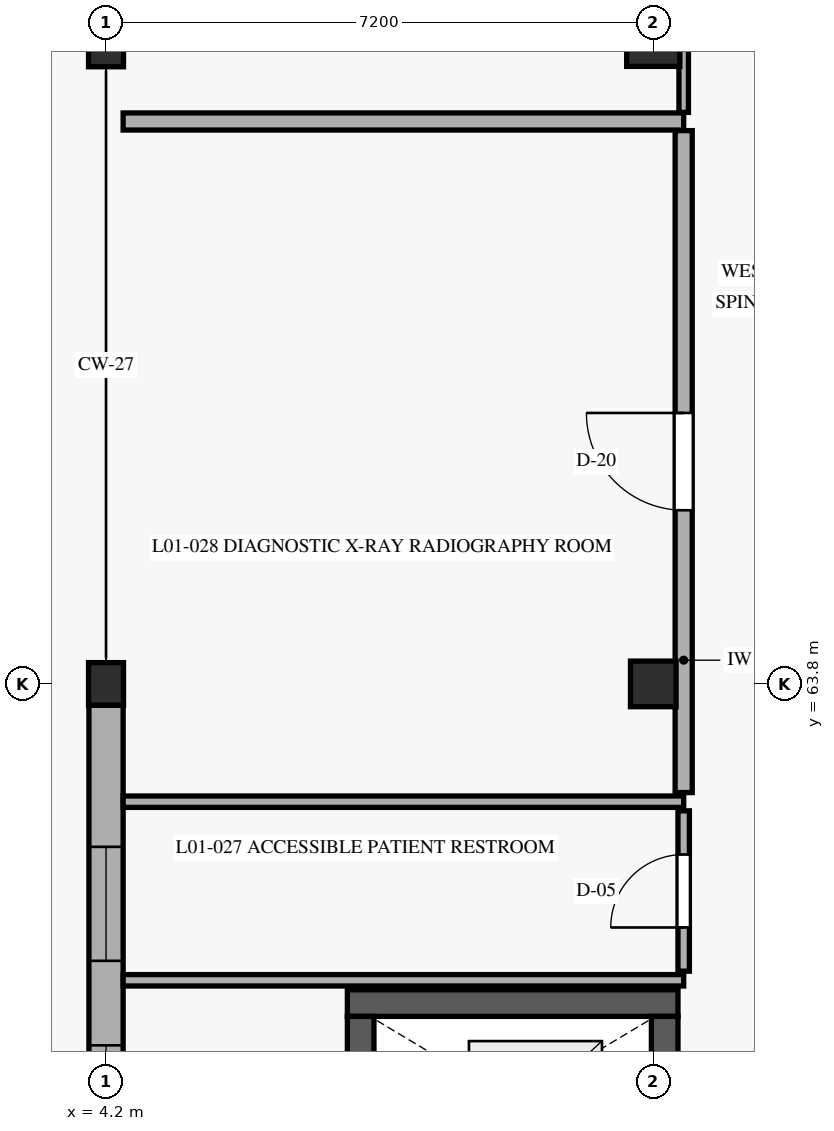
"""IFC4 building model, lengths in metres.
Left out: names, types, materials, properties, quantities, classifications, styles, units other than length and angle.
Written with IfcOpenShell. Run it as: python <this file> out.ifc"""

import sys

from ifc_helpers import new_model, si_unit, direction, frame, frame_2d, origin, origin_with_axes, origin_2d, place, context, subcontext, project, spatial, rectangle, extrude, element, fill, save


model = new_model("IFC4")
c1 = context("Model", 3, precision=1e-05, world=origin(), true_north=direction((0.0, 1.0)))
c2 = subcontext(c1, "Body", "Model", "MODEL_VIEW")
j1 = project(units=[si_unit("LENGTHUNIT", "METRE"), si_unit("PLANEANGLEUNIT", "RADIAN")], contexts=[c1])
p1 = place(None, origin())
s1 = spatial("IfcSite", under=j1, at=p1, CompositionType="ELEMENT")
p2 = place(p1, origin())
s2 = spatial("IfcBuilding", under=s1, at=p2, CompositionType="ELEMENT")
p3 = place(p2, origin())
s3 = spatial("IfcBuildingStorey", under=s2, at=p3, CompositionType="ELEMENT", Elevation=0.0)
for number, where, z_axis, x_axis in (
    (1, (4.2, 63.8, 0.0), (0.0, 0.0, 1.0), (1.0, 0.0, 0.0)),
    (2, (4.2, 72.2, 0.0), (0.0, 0.0, 1.0), (1.0, 0.0, 0.0)),
):
    element("IfcColumn", number, at=place(p3, frame(where, z_axis=z_axis, x_axis=x_axis)), inside=s3, PredefinedType="COLUMN", context=c2, shape_type="SweptSolid", body=[
        extrude(rectangle(XDim=0.46, YDim=0.56, at=origin_2d()), origin(), (0.0, 0.0, 1.0), 4.8),
    ])
p4 = place(p3, frame((11.4, 63.8, 0.0), z_axis=(0.0, 0.0, 1.0), x_axis=(1.0, 0.0, 0.0)))
e3 = element("IfcColumn", 3, at=p4, inside=s3, PredefinedType="COLUMN", context=c2, shape_type="SweptSolid", body=[
    extrude(rectangle(XDim=0.6, YDim=0.6, at=origin_2d()), origin(), (0.0, 0.0, 1.0), 4.8),
])
p5 = place(p3, frame((11.4, 72.2, 0.0), z_axis=(0.0, 0.0, 1.0), x_axis=(1.0, 0.0, 0.0)))
e4 = element("IfcColumn", 4, at=p5, inside=s3, PredefinedType="COLUMN", context=c2, shape_type="SweptSolid", body=[
    extrude(rectangle(XDim=0.7, YDim=0.55, at=origin_2d()), origin(), (0.0, 0.0, 1.0), 4.8),
])
p6 = place(p3, frame((11.725, 59.6, 0.0), z_axis=(0.0, 0.0, 1.0), x_axis=(-1.0, 0.0, 0.0)))
e5 = element("IfcWall", 5, at=p6, inside=s3, PredefinedType="SHEAR", context=c2, shape_type="SweptSolid", body=[
    extrude(rectangle(XDim=4.35, YDim=0.35, at=frame_2d((2.175, 0.0))), origin(), (0.0, 0.0, 1.0), 4.5),
])
p7 = place(p3, frame((7.55, 59.425, 0.0), z_axis=(0.0, 0.0, 1.0), x_axis=(0.0, -1.0, 0.0)))
e6 = element("IfcWall", 6, at=p7, inside=s3, PredefinedType="SHEAR", context=c2, shape_type="SweptSolid", body=[
    extrude(rectangle(XDim=9.45, YDim=0.35, at=frame_2d((4.725, 0.0))), origin(), (0.0, 0.0, 1.0), 4.5),
])
p8 = place(p7, frame((8.05, 0.0, 0.0)))
e7 = element("IfcOpeningElement", 7, at=p8, cuts=e6, PredefinedType="OPENING", context=c2, shape_type="SweptSolid", body=[
    extrude(rectangle(XDim=1.1, YDim=2.2, at=frame_2d((0.55, 1.1))), frame((0.0, 0.185, 0.0), z_axis=(0.0, -1.0, 0.0), x_axis=(1.0, 0.0, 0.0)), (0.0, 0.0, 1.0), 0.37),
])
p9 = place(p3, frame((11.55, 49.975, 0.0), z_axis=(0.0, 0.0, 1.0), x_axis=(0.0, 1.0, 0.0)))
e8 = element("IfcWall", 8, at=p9, inside=s3, PredefinedType="SHEAR", context=c2, shape_type="SweptSolid", body=[
    extrude(rectangle(XDim=9.45, YDim=0.35, at=frame_2d((4.725, 0.0))), origin(), (0.0, 0.0, 1.0), 4.5),
])
p10 = place(p9, frame((0.2, 0.0, 0.0)))
e9 = element("IfcOpeningElement", 9, at=p10, cuts=e8, PredefinedType="OPENING", context=c2, shape_type="SweptSolid", body=[
    extrude(rectangle(XDim=1.1, YDim=2.2, at=frame_2d((0.55, 1.1))), frame((0.0, 0.185, 0.0), z_axis=(0.0, -1.0, 0.0), x_axis=(1.0, 0.0, 0.0)), (0.0, 0.0, 1.0), 0.37),
])
p11 = place(p9, frame((7.815, 0.0, 0.0)))
e10 = element("IfcOpeningElement", 10, at=p11, cuts=e8, PredefinedType="OPENING", context=c2, shape_type="SweptSolid", body=[
    extrude(rectangle(XDim=1.02, YDim=2.15, at=frame_2d((0.51, 1.075))), frame((0.0, 0.185, 0.0), z_axis=(0.0, -1.0, 0.0), x_axis=(1.0, 0.0, 0.0)), (0.0, 0.0, 1.0), 0.37),
])
p12 = place(p3, frame((4.2, 63.518, 0.0), z_axis=(0.0, 0.0, 1.0), x_axis=(0.0, -1.0, 0.0)))
e11 = element("IfcWall", 11, at=p12, inside=s3, PredefinedType="SOLIDWALL", context=c2, shape_type="SweptSolid", body=[
    extrude(rectangle(XDim=7.836, YDim=0.45, at=frame_2d((3.918, 0.0))), origin(), (0.0, 0.0, 1.0), 3.95),
])
p13 = place(p12, frame((1.862, 0.0, 0.65)))
e12 = element("IfcOpeningElement", 12, at=p13, cuts=e11, PredefinedType="OPENING", context=c2, shape_type="SweptSolid", body=[
    extrude(rectangle(XDim=1.5, YDim=2.2, at=frame_2d((0.75, 1.1))), frame((0.0, 0.235, 0.0), z_axis=(0.0, -1.0, 0.0), x_axis=(1.0, 0.0, 0.0)), (0.0, 0.0, 1.0), 0.47),
])
p14 = place(p12, frame((4.474, 0.0, 0.65)))
e13 = element("IfcOpeningElement", 13, at=p14, cuts=e11, PredefinedType="OPENING", context=c2, shape_type="SweptSolid", body=[
    extrude(rectangle(XDim=1.5, YDim=2.2, at=frame_2d((0.75, 1.1))), frame((0.0, 0.235, 0.0), z_axis=(0.0, -1.0, 0.0), x_axis=(1.0, 0.0, 0.0)), (0.0, 0.0, 1.0), 0.47),
])
p15 = place(p3, frame((11.8, 60.02, 0.0), z_axis=(0.0, 0.0, 1.0), x_axis=(0.0, 1.0, 0.0)))
e14 = element("IfcWall", 14, at=p15, inside=s3, PredefinedType="PARTITIONING", context=c2, shape_type="SweptSolid", body=[
    extrude(rectangle(XDim=2.11, YDim=0.15, at=frame_2d((1.055, 0.0))), origin(), (0.0, 0.0, 1.0), 3.895),
])
p16 = place(p15, frame((0.575, 0.0, 0.0)))
e15 = element("IfcOpeningElement", 15, at=p16, cuts=e14, PredefinedType="OPENING", context=c2, shape_type="SweptSolid", body=[
    extrude(rectangle(XDim=0.96, YDim=2.1, at=frame_2d((0.48, 1.05))), frame((0.0, 0.085, 0.0), z_axis=(0.0, -1.0, 0.0), x_axis=(1.0, 0.0, 0.0)), (0.0, 0.0, 1.0), 0.17),
])
for number, where, z_axis, x_axis in (
    (16, (4.425, 62.25, 0.0), (0.0, 0.0, 1.0), (1.0, 0.0, 0.0)),
    (17, (4.425, 59.9, 0.0), (0.0, 0.0, 1.0), (1.0, 0.0, 0.0)),
):
    element("IfcWall", number, at=place(p3, frame(where, z_axis=z_axis, x_axis=x_axis)), inside=s3, PredefinedType="PARTITIONING", context=c2, shape_type="SweptSolid", body=[
        extrude(rectangle(XDim=7.375, YDim=0.15, at=frame_2d((3.688, 0.0))), origin(), (0.0, 0.0, 1.0), 3.895),
    ])
p17 = place(p3, frame((11.8, 62.37, 0.0), z_axis=(0.0, 0.0, 1.0), x_axis=(0.0, 1.0, 0.0)))
e18 = element("IfcWall", 18, at=p17, inside=s3, PredefinedType="SOLIDWALL", context=c2, shape_type="SweptSolid", body=[
    extrude(rectangle(XDim=8.71, YDim=0.225, at=frame_2d((4.355, 0.0))), origin(), (0.0, 0.0, 1.0), 3.895),
])
p18 = place(p17, frame((3.715, 0.0, 0.0)))
e19 = element("IfcOpeningElement", 19, at=p18, cuts=e18, PredefinedType="OPENING", context=c2, shape_type="SweptSolid", body=[
    extrude(rectangle(XDim=1.28, YDim=2.25, at=frame_2d((0.64, 1.125))), frame((0.0, 0.123, 0.0), z_axis=(0.0, -1.0, 0.0), x_axis=(1.0, 0.0, 0.0)), (0.0, 0.0, 1.0), 0.245),
])
p19 = place(p3, frame((4.425, 71.2, 0.0), z_axis=(0.0, 0.0, 1.0), x_axis=(1.0, 0.0, 0.0)))
e20 = element("IfcWall", 20, at=p19, inside=s3, PredefinedType="SOLIDWALL", context=c2, shape_type="SweptSolid", body=[
    extrude(rectangle(XDim=7.375, YDim=0.225, at=frame_2d((3.688, 0.0))), origin(), (0.0, 0.0, 1.0), 3.945),
])
p20 = place(p3, frame((11.8, 71.32, 0.0), z_axis=(0.0, 0.0, 1.0), x_axis=(0.0, 1.0, 0.0)))
e21 = element("IfcWall", 21, at=p20, inside=s3, PredefinedType="PARTITIONING", context=c2, shape_type="SweptSolid", body=[
    extrude(rectangle(XDim=6.97, YDim=0.125, at=frame_2d((3.485, 0.0))), origin(), (0.0, 0.0, 1.0), 3.895),
])
p21 = place(p20, frame((2.839, 0.0, 0.0)))
e22 = element("IfcOpeningElement", 22, at=p21, cuts=e21, PredefinedType="OPENING", context=c2, shape_type="SweptSolid", body=[
    extrude(rectangle(XDim=1.14, YDim=2.22, at=frame_2d((0.57, 1.11))), frame((0.0, 0.073, 0.0), z_axis=(0.0, -1.0, 0.0), x_axis=(1.0, 0.0, 0.0)), (0.0, 0.0, 1.0), 0.145),
])
p22 = place(p13, origin_with_axes())
e23 = element("IfcWindow", 23, at=p22, inside=s3, PartitioningType="SINGLE_PANEL", PredefinedType="WINDOW", context=c2, shape_type="SweptSolid", body=[
    extrude(rectangle(XDim=1.5, YDim=2.2, at=frame_2d((0.75, 1.1))), frame((0.0, 0.03, 0.0), z_axis=(0.0, -1.0, 0.0), x_axis=(1.0, 0.0, 0.0)), (0.0, 0.0, 1.0), 0.06),
])
fill(e12, e23)
p23 = place(p14, origin_with_axes())
e24 = element("IfcWindow", 24, at=p23, inside=s3, PartitioningType="SINGLE_PANEL", PredefinedType="WINDOW", context=c2, shape_type="SweptSolid", body=[
    extrude(rectangle(XDim=1.5, YDim=2.2, at=frame_2d((0.75, 1.1))), frame((0.0, 0.03, 0.0), z_axis=(0.0, -1.0, 0.0), x_axis=(1.0, 0.0, 0.0)), (0.0, 0.0, 1.0), 0.06),
])
fill(e13, e24)
p24 = place(p16, origin_with_axes())
e25 = element("IfcDoor", 25, at=p24, inside=s3, OperationType="SINGLE_SWING_LEFT", PredefinedType="DOOR", context=c2, shape_type="SweptSolid", body=[
    extrude(rectangle(XDim=0.96, YDim=2.1, at=frame_2d((0.48, 1.05))), frame((0.0, 0.025, 0.0), z_axis=(0.0, -1.0, 0.0), x_axis=(1.0, 0.0, 0.0)), (0.0, 0.0, 1.0), 0.05),
])
fill(e15, e25)
p25 = place(p18, origin_with_axes())
e26 = element("IfcDoor", 26, at=p25, inside=s3, OperationType="SINGLE_SWING_RIGHT", PredefinedType="DOOR", context=c2, shape_type="SweptSolid", body=[
    extrude(rectangle(XDim=1.28, YDim=2.25, at=frame_2d((0.64, 1.125))), frame((0.0, 0.025, 0.0), z_axis=(0.0, -1.0, 0.0), x_axis=(1.0, 0.0, 0.0)), (0.0, 0.0, 1.0), 0.05),
])
fill(e19, e26)
save(model, sys.argv[1])
